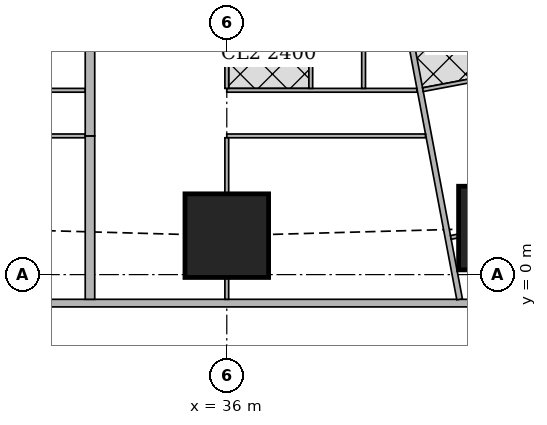
"""IFC4 building model, lengths in metres.
Left out: names, types, materials, properties, quantities, classifications, styles, units other than length and angle.
Written with IfcOpenShell. Run it as: python <this file> out.ifc"""

import sys

from ifc_helpers import new_model, si_unit, direction, frame, frame_2d, origin, origin_2d, place, context, subcontext, project, spatial, rectangle, extrude, element, fill, save


model = new_model("IFC4")
c1 = context("Model", 3, precision=1e-05, world=origin(), true_north=direction((0.0, 1.0)))
c2 = subcontext(c1, "Body", "Model", "MODEL_VIEW")
j1 = project(units=[si_unit("LENGTHUNIT", "METRE"), si_unit("PLANEANGLEUNIT", "RADIAN")], contexts=[c1])
p1 = place(None, origin())
s1 = spatial("IfcSite", under=j1, at=p1, CompositionType="ELEMENT")
p2 = place(p1, origin())
s2 = spatial("IfcBuilding", under=s1, at=p2, CompositionType="ELEMENT")
p3 = place(p2, frame((0.0, 0.0, 100.4)))
s3 = spatial("IfcBuildingStorey", under=s2, at=p3, CompositionType="ELEMENT", Elevation=100.4)
for number, where, z_axis, x_axis in (
    (1, (36.0, 1.025, 0.0), (0.0, 0.0, 1.0), (1.0, 0.0, 0.0)),
    (2, (43.2, 1.225, 0.0), (0.0, 0.0, 1.0), (1.0, 0.0, 0.0)),
):
    element("IfcColumn", number, at=place(p3, frame(where, z_axis=z_axis, x_axis=x_axis)), inside=s3, PredefinedType="COLUMN", context=c2, shape_type="SweptSolid", body=[
        extrude(rectangle(XDim=2.2, YDim=2.2, at=origin_2d()), origin(), (0.0, 0.0, 1.0), 3.75),
    ])
p4 = place(p3, frame((2.163, -0.75, 0.0), z_axis=(0.0, 0.0, 1.0), x_axis=(1.0, 0.0, 0.0)))
e3 = element("IfcWall", 3, at=p4, inside=s3, PredefinedType="SOLIDWALL", context=c2, shape_type="SweptSolid", body=[
    extrude(rectangle(XDim=45.628, YDim=0.2, at=frame_2d((22.814, 0.0))), origin(), (0.0, 0.0, 1.0), 3.5),
])
p5 = place(p4, frame((9.537, 0.0, 0.9)))
e4 = element("IfcOpeningElement", 4, at=p5, cuts=e3, PredefinedType="OPENING", context=c2, shape_type="SweptSolid", body=[
    extrude(rectangle(XDim=1.8, YDim=1.5, at=frame_2d((0.9, 0.75))), frame((0.0, 0.11, 0.0), z_axis=(0.0, -1.0, 0.0), x_axis=(1.0, 0.0, 0.0)), (0.0, 0.0, 1.0), 0.22),
])
p6 = place(p4, frame((13.137, 0.0, 0.9)))
e5 = element("IfcOpeningElement", 5, at=p6, cuts=e3, PredefinedType="OPENING", context=c2, shape_type="SweptSolid", body=[
    extrude(rectangle(XDim=1.8, YDim=1.5, at=frame_2d((0.9, 0.75))), frame((0.0, 0.11, 0.0), z_axis=(0.0, -1.0, 0.0), x_axis=(1.0, 0.0, 0.0)), (0.0, 0.0, 1.0), 0.22),
])
p7 = place(p4, frame((16.737, 0.0, 0.9)))
e6 = element("IfcOpeningElement", 6, at=p7, cuts=e3, PredefinedType="OPENING", context=c2, shape_type="SweptSolid", body=[
    extrude(rectangle(XDim=1.8, YDim=1.5, at=frame_2d((0.9, 0.75))), frame((0.0, 0.11, 0.0), z_axis=(0.0, -1.0, 0.0), x_axis=(1.0, 0.0, 0.0)), (0.0, 0.0, 1.0), 0.22),
])
p8 = place(p4, frame((20.337, 0.0, 0.9)))
e7 = element("IfcOpeningElement", 7, at=p8, cuts=e3, PredefinedType="OPENING", context=c2, shape_type="SweptSolid", body=[
    extrude(rectangle(XDim=1.8, YDim=1.5, at=frame_2d((0.9, 0.75))), frame((0.0, 0.11, 0.0), z_axis=(0.0, -1.0, 0.0), x_axis=(1.0, 0.0, 0.0)), (0.0, 0.0, 1.0), 0.22),
])
p9 = place(p4, frame((23.937, 0.0, 0.9)))
e8 = element("IfcOpeningElement", 8, at=p9, cuts=e3, PredefinedType="OPENING", context=c2, shape_type="SweptSolid", body=[
    extrude(rectangle(XDim=1.8, YDim=1.5, at=frame_2d((0.9, 0.75))), frame((0.0, 0.11, 0.0), z_axis=(0.0, -1.0, 0.0), x_axis=(1.0, 0.0, 0.0)), (0.0, 0.0, 1.0), 0.22),
])
p10 = place(p4, frame((27.537, 0.0, 0.9)))
e9 = element("IfcOpeningElement", 9, at=p10, cuts=e3, PredefinedType="OPENING", context=c2, shape_type="SweptSolid", body=[
    extrude(rectangle(XDim=1.8, YDim=1.5, at=frame_2d((0.9, 0.75))), frame((0.0, 0.11, 0.0), z_axis=(0.0, -1.0, 0.0), x_axis=(1.0, 0.0, 0.0)), (0.0, 0.0, 1.0), 0.22),
])
p11 = place(p4, frame((31.137, 0.0, 0.9)))
e10 = element("IfcOpeningElement", 10, at=p11, cuts=e3, PredefinedType="OPENING", context=c2, shape_type="SweptSolid", body=[
    extrude(rectangle(XDim=1.8, YDim=1.5, at=frame_2d((0.9, 0.75))), frame((0.0, 0.11, 0.0), z_axis=(0.0, -1.0, 0.0), x_axis=(1.0, 0.0, 0.0)), (0.0, 0.0, 1.0), 0.22),
])
p12 = place(p4, frame((34.737, 0.0, 0.9)))
e11 = element("IfcOpeningElement", 11, at=p12, cuts=e3, PredefinedType="OPENING", context=c2, shape_type="SweptSolid", body=[
    extrude(rectangle(XDim=1.8, YDim=1.5, at=frame_2d((0.9, 0.75))), frame((0.0, 0.11, 0.0), z_axis=(0.0, -1.0, 0.0), x_axis=(1.0, 0.0, 0.0)), (0.0, 0.0, 1.0), 0.22),
])
p13 = place(p3, frame((33.382, 45.65, 0.0), z_axis=(0.0, 0.0, 1.0), x_axis=(0.185593544777, -0.982626600565, 0.0)))
e12 = element("IfcWall", 12, at=p13, inside=s3, PredefinedType="SOLIDWALL", context=c2, shape_type="SweptSolid", body=[
    extrude(rectangle(XDim=47.118, YDim=0.15, at=frame_2d((23.559, 0.0))), origin(), (0.0, 0.0, 1.0), 2.2),
])
p14 = place(p13, frame((10.662, 0.0, 0.0)))
e13 = element("IfcOpeningElement", 13, at=p14, cuts=e12, PredefinedType="OPENING", context=c2, shape_type="SweptSolid", body=[
    extrude(rectangle(XDim=1.0, YDim=2.1, at=frame_2d((0.5, 1.05))), frame((0.0, 0.085, 0.0), z_axis=(0.0, -1.0, 0.0), x_axis=(1.0, 0.0, 0.0)), (0.0, 0.0, 1.0), 0.17),
])
p15 = place(p13, frame((15.237, 0.0, 0.0)))
e14 = element("IfcOpeningElement", 14, at=p15, cuts=e12, PredefinedType="OPENING", context=c2, shape_type="SweptSolid", body=[
    extrude(rectangle(XDim=1.0, YDim=2.1, at=frame_2d((0.5, 1.05))), frame((0.0, 0.085, 0.0), z_axis=(0.0, -1.0, 0.0), x_axis=(1.0, 0.0, 0.0)), (0.0, 0.0, 1.0), 0.17),
])
p16 = place(p13, frame((27.341, 0.0, 0.0)))
e15 = element("IfcOpeningElement", 15, at=p16, cuts=e12, PredefinedType="OPENING", context=c2, shape_type="SweptSolid", body=[
    extrude(rectangle(XDim=1.0, YDim=2.1, at=frame_2d((0.5, 1.05))), frame((0.0, 0.085, 0.0), z_axis=(0.0, -1.0, 0.0), x_axis=(1.0, 0.0, 0.0)), (0.0, 0.0, 1.0), 0.17),
])
p17 = place(p13, frame((33.833, 0.0, 0.0)))
e16 = element("IfcOpeningElement", 16, at=p17, cuts=e12, PredefinedType="OPENING", context=c2, shape_type="SweptSolid", body=[
    extrude(rectangle(XDim=1.0, YDim=2.1, at=frame_2d((0.5, 1.05))), frame((0.0, 0.085, 0.0), z_axis=(0.0, -1.0, 0.0), x_axis=(1.0, 0.0, 0.0)), (0.0, 0.0, 1.0), 0.17),
])
p18 = place(p3, frame((32.275, 3.65, 0.0), z_axis=(0.0, 0.0, 1.0), x_axis=(-1.0, 0.0, 0.0)))
e17 = element("IfcWall", 17, at=p18, inside=s3, PredefinedType="PARTITIONING", context=c2, shape_type="SweptSolid", body=[
    extrude(rectangle(XDim=7.075, YDim=0.1, at=frame_2d((3.538, 0.0))), origin(), (0.0, 0.0, 1.0), 3.5),
])
p19 = place(p18, frame((5.975, 0.0, 0.0)))
e18 = element("IfcOpeningElement", 18, at=p19, cuts=e17, PredefinedType="OPENING", context=c2, shape_type="SweptSolid", body=[
    extrude(rectangle(XDim=0.9, YDim=2.1, at=frame_2d((0.45, 1.05))), frame((0.0, 0.06, 0.0), z_axis=(0.0, -1.0, 0.0), x_axis=(1.0, 0.0, 0.0)), (0.0, 0.0, 1.0), 0.12),
])
p20 = place(p18, frame((2.375, 0.0, 0.0)))
e19 = element("IfcOpeningElement", 19, at=p20, cuts=e17, PredefinedType="OPENING", context=c2, shape_type="SweptSolid", body=[
    extrude(rectangle(XDim=0.9, YDim=2.1, at=frame_2d((0.45, 1.05))), frame((0.0, 0.06, 0.0), z_axis=(0.0, -1.0, 0.0), x_axis=(1.0, 0.0, 0.0)), (0.0, 0.0, 1.0), 0.12),
])
p21 = place(p3, frame((32.275, 4.85, 0.0), z_axis=(0.0, 0.0, 1.0), x_axis=(-1.0, 0.0, 0.0)))
e20 = element("IfcWall", 20, at=p21, inside=s3, PredefinedType="PARTITIONING", context=c2, shape_type="SweptSolid", body=[
    extrude(rectangle(XDim=7.075, YDim=0.1, at=frame_2d((3.538, 0.0))), origin(), (0.0, 0.0, 1.0), 3.5),
])
p22 = place(p21, frame((5.52, 0.0, 0.0)))
e21 = element("IfcOpeningElement", 21, at=p22, cuts=e20, PredefinedType="OPENING", context=c2, shape_type="SweptSolid", body=[
    extrude(rectangle(XDim=0.9, YDim=2.1, at=frame_2d((0.45, 1.05))), frame((0.0, 0.06, 0.0), z_axis=(0.0, -1.0, 0.0), x_axis=(1.0, 0.0, 0.0)), (0.0, 0.0, 1.0), 0.12),
])
p23 = place(p21, frame((2.225, 0.0, 0.0)))
e22 = element("IfcOpeningElement", 22, at=p23, cuts=e20, PredefinedType="OPENING", context=c2, shape_type="SweptSolid", body=[
    extrude(rectangle(XDim=0.9, YDim=2.1, at=frame_2d((0.45, 1.05))), frame((0.0, 0.06, 0.0), z_axis=(0.0, -1.0, 0.0), x_axis=(1.0, 0.0, 0.0)), (0.0, 0.0, 1.0), 0.12),
])
p24 = place(p21, frame((3.72, 0.0, 0.0)))
e23 = element("IfcOpeningElement", 23, at=p24, cuts=e20, PredefinedType="OPENING", context=c2, shape_type="SweptSolid", body=[
    extrude(rectangle(XDim=0.9, YDim=2.1, at=frame_2d((0.45, 1.05))), frame((0.0, 0.06, 0.0), z_axis=(0.0, -1.0, 0.0), x_axis=(1.0, 0.0, 0.0)), (0.0, 0.0, 1.0), 0.12),
])
p25 = place(p21, frame((0.425, 0.0, 0.0)))
e24 = element("IfcOpeningElement", 24, at=p25, cuts=e20, PredefinedType="OPENING", context=c2, shape_type="SweptSolid", body=[
    extrude(rectangle(XDim=0.9, YDim=2.1, at=frame_2d((0.45, 1.05))), frame((0.0, 0.06, 0.0), z_axis=(0.0, -1.0, 0.0), x_axis=(1.0, 0.0, 0.0)), (0.0, 0.0, 1.0), 0.12),
])
p26 = place(p3, frame((41.229, 3.65, 0.0), z_axis=(0.0, 0.0, 1.0), x_axis=(-1.0, 0.0, 0.0)))
e25 = element("IfcWall", 25, at=p26, inside=s3, PredefinedType="PARTITIONING", context=c2, shape_type="SweptSolid", body=[
    extrude(rectangle(XDim=5.229, YDim=0.1, at=frame_2d((2.615, 0.0))), origin(), (0.0, 0.0, 1.0), 3.5),
])
p27 = place(p26, frame((4.129, 0.0, 0.0)))
e26 = element("IfcOpeningElement", 26, at=p27, cuts=e25, PredefinedType="OPENING", context=c2, shape_type="SweptSolid", body=[
    extrude(rectangle(XDim=0.9, YDim=2.1, at=frame_2d((0.45, 1.05))), frame((0.0, 0.06, 0.0), z_axis=(0.0, -1.0, 0.0), x_axis=(1.0, 0.0, 0.0)), (0.0, 0.0, 1.0), 0.12),
])
p28 = place(p3, frame((41.002, 4.85, 0.0), z_axis=(0.0, 0.0, 1.0), x_axis=(-1.0, 0.0, 0.0)))
e27 = element("IfcWall", 27, at=p28, inside=s3, PredefinedType="PARTITIONING", context=c2, shape_type="SweptSolid", body=[
    extrude(rectangle(XDim=5.002, YDim=0.1, at=frame_2d((2.501, 0.0))), origin(), (0.0, 0.0, 1.0), 3.5),
])
p29 = place(p28, frame((3.447, 0.0, 0.0)))
e28 = element("IfcOpeningElement", 28, at=p29, cuts=e27, PredefinedType="OPENING", context=c2, shape_type="SweptSolid", body=[
    extrude(rectangle(XDim=0.9, YDim=2.1, at=frame_2d((0.45, 1.05))), frame((0.0, 0.06, 0.0), z_axis=(0.0, -1.0, 0.0), x_axis=(1.0, 0.0, 0.0)), (0.0, 0.0, 1.0), 0.12),
])
p30 = place(p28, frame((0.15, 0.0, 0.0)))
e29 = element("IfcOpeningElement", 29, at=p30, cuts=e27, PredefinedType="OPENING", context=c2, shape_type="SweptSolid", body=[
    extrude(rectangle(XDim=0.9, YDim=2.1, at=frame_2d((0.45, 1.05))), frame((0.0, 0.06, 0.0), z_axis=(0.0, -1.0, 0.0), x_axis=(1.0, 0.0, 0.0)), (0.0, 0.0, 1.0), 0.12),
])
p31 = place(p28, frame((1.647, 0.0, 0.0)))
e30 = element("IfcOpeningElement", 30, at=p31, cuts=e27, PredefinedType="OPENING", context=c2, shape_type="SweptSolid", body=[
    extrude(rectangle(XDim=0.9, YDim=2.1, at=frame_2d((0.45, 1.05))), frame((0.0, 0.06, 0.0), z_axis=(0.0, -1.0, 0.0), x_axis=(1.0, 0.0, 0.0)), (0.0, 0.0, 1.0), 0.12),
])
p32 = place(p3, frame((36.0, -0.65, 0.0), z_axis=(0.0, 0.0, 1.0), x_axis=(0.0, 1.0, 0.0)))
e31 = element("IfcWall", 31, at=p32, inside=s3, PredefinedType="PARTITIONING", context=c2, shape_type="SweptSolid", body=[
    extrude(rectangle(XDim=0.574, YDim=0.1, at=frame_2d((0.287, 0.0))), origin(), (0.0, 0.0, 1.0), 3.5),
])
p33 = place(p3, frame((36.0, 2.126, 0.0), z_axis=(0.0, 0.0, 1.0), x_axis=(0.0, 1.0, 0.0)))
e32 = element("IfcWall", 32, at=p33, inside=s3, PredefinedType="PARTITIONING", context=c2, shape_type="SweptSolid", body=[
    extrude(rectangle(XDim=1.474, YDim=0.1, at=frame_2d((0.737, 0.0))), origin(), (0.0, 0.0, 1.0), 3.5),
])
p34 = place(p3, frame((36.0, 4.9, 0.0), z_axis=(0.0, 0.0, 1.0), x_axis=(0.0, 1.0, 0.0)))
e33 = element("IfcWall", 33, at=p34, inside=s3, PredefinedType="PARTITIONING", context=c2, shape_type="SweptSolid", body=[
    extrude(rectangle(XDim=1.799, YDim=0.1, at=frame_2d((0.899, 0.0))), origin(), (0.0, 0.0, 1.0), 3.5),
])
for number, where, z_axis, x_axis in (
    (34, (39.6, 4.9, 0.0), (0.0, 0.0, 1.0), (0.0, 1.0, 0.0)),
    (35, (38.21, 4.9, 0.0), (0.0, 0.0, 1.0), (0.0, 1.0, 0.0)),
):
    element("IfcWall", number, at=place(p3, frame(where, z_axis=z_axis, x_axis=x_axis)), inside=s3, PredefinedType="PARTITIONING", context=c2, shape_type="SweptSolid", body=[
        extrude(rectangle(XDim=3.275, YDim=0.1, at=frame_2d((1.638, 0.0))), origin(), (0.0, 0.0, 1.0), 3.5),
    ])
p35 = place(p3, frame((32.4, -0.65, 0.0), z_axis=(0.0, 0.0, 1.0), x_axis=(0.0, 1.0, 0.0)))
e36 = element("IfcWall", 36, at=p35, inside=s3, PredefinedType="SOLIDWALL", context=c2, shape_type="SweptSolid", body=[
    extrude(rectangle(XDim=4.3, YDim=0.25, at=frame_2d((2.15, 0.0))), origin(), (0.0, 0.0, 1.0), 2.2),
])
p36 = place(p3, frame((32.4, 3.65, 0.0), z_axis=(0.0, 0.0, 1.0), x_axis=(0.0, 1.0, 0.0)))
e37 = element("IfcWall", 37, at=p36, inside=s3, PredefinedType="SOLIDWALL", context=c2, shape_type="SweptSolid", body=[
    extrude(rectangle(XDim=4.525, YDim=0.25, at=frame_2d((2.263, 0.0))), origin(), (0.0, 0.0, 1.0), 3.5),
])
p37 = place(p3, frame((42.09, 1.016, 0.0), z_axis=(0.0, 0.0, 1.0), x_axis=(-0.982208563973, -0.187793335502, 0.0)))
e38 = element("IfcWall", 38, at=p37, inside=s3, PredefinedType="PARTITIONING", context=c2, shape_type="SweptSolid", body=[
    extrude(rectangle(XDim=0.198, YDim=0.1, at=frame_2d((0.099, 0.0))), origin(), (0.0, 0.0, 1.0), 2.05),
])
p38 = place(p3, frame((44.379, 5.474, 0.0), z_axis=(0.0, 0.0, 1.0), x_axis=(-0.982607026909, -0.185697147715, 0.0)))
e39 = element("IfcWall", 39, at=p38, inside=s3, PredefinedType="PARTITIONING", context=c2, shape_type="SweptSolid", body=[
    extrude(rectangle(XDim=3.275, YDim=0.1, at=frame_2d((1.637, 0.0))), origin(), (0.0, 0.0, 1.0), 3.5),
])
p39 = place(p10, origin())
e40 = element("IfcWindow", 40, at=p39, inside=s3, PartitioningType="SINGLE_PANEL", PredefinedType="WINDOW", context=c2, shape_type="SweptSolid", body=[
    extrude(rectangle(XDim=1.8, YDim=1.5, at=frame_2d((0.9, 0.75))), frame((0.0, 0.03, 0.0), z_axis=(0.0, -1.0, 0.0), x_axis=(1.0, 0.0, 0.0)), (0.0, 0.0, 1.0), 0.06),
])
fill(e9, e40)
p40 = place(p11, origin())
e41 = element("IfcWindow", 41, at=p40, inside=s3, PartitioningType="SINGLE_PANEL", PredefinedType="WINDOW", context=c2, shape_type="SweptSolid", body=[
    extrude(rectangle(XDim=1.8, YDim=1.5, at=frame_2d((0.9, 0.75))), frame((0.0, 0.03, 0.0), z_axis=(0.0, -1.0, 0.0), x_axis=(1.0, 0.0, 0.0)), (0.0, 0.0, 1.0), 0.06),
])
fill(e10, e41)
p41 = place(p12, origin())
e42 = element("IfcWindow", 42, at=p41, inside=s3, PartitioningType="SINGLE_PANEL", PredefinedType="WINDOW", context=c2, shape_type="SweptSolid", body=[
    extrude(rectangle(XDim=1.8, YDim=1.5, at=frame_2d((0.9, 0.75))), frame((0.0, 0.03, 0.0), z_axis=(0.0, -1.0, 0.0), x_axis=(1.0, 0.0, 0.0)), (0.0, 0.0, 1.0), 0.06),
])
fill(e11, e42)
p42 = place(p25, origin())
e43 = element("IfcDoor", 43, at=p42, inside=s3, OperationType="SINGLE_SWING_RIGHT", PredefinedType="DOOR", context=c2, shape_type="SweptSolid", body=[
    extrude(rectangle(XDim=0.9, YDim=2.1, at=frame_2d((0.45, 1.05))), frame((0.0, 0.025, 0.0), z_axis=(0.0, -1.0, 0.0), x_axis=(1.0, 0.0, 0.0)), (0.0, 0.0, 1.0), 0.05),
])
fill(e24, e43)
p43 = place(p27, origin())
e44 = element("IfcDoor", 44, at=p43, inside=s3, OperationType="SINGLE_SWING_LEFT", PredefinedType="DOOR", context=c2, shape_type="SweptSolid", body=[
    extrude(rectangle(XDim=0.9, YDim=2.1, at=frame_2d((0.45, 1.05))), frame((0.0, 0.025, 0.0), z_axis=(0.0, -1.0, 0.0), x_axis=(1.0, 0.0, 0.0)), (0.0, 0.0, 1.0), 0.05),
])
fill(e26, e44)
p44 = place(p29, origin())
e45 = element("IfcDoor", 45, at=p44, inside=s3, OperationType="SINGLE_SWING_LEFT", PredefinedType="DOOR", context=c2, shape_type="SweptSolid", body=[
    extrude(rectangle(XDim=0.9, YDim=2.1, at=frame_2d((0.45, 1.05))), frame((0.0, 0.025, 0.0), z_axis=(0.0, -1.0, 0.0), x_axis=(1.0, 0.0, 0.0)), (0.0, 0.0, 1.0), 0.05),
])
fill(e28, e45)
p45 = place(p30, origin())
e46 = element("IfcDoor", 46, at=p45, inside=s3, OperationType="SINGLE_SWING_RIGHT", PredefinedType="DOOR", context=c2, shape_type="SweptSolid", body=[
    extrude(rectangle(XDim=0.9, YDim=2.1, at=frame_2d((0.45, 1.05))), frame((0.0, 0.025, 0.0), z_axis=(0.0, -1.0, 0.0), x_axis=(1.0, 0.0, 0.0)), (0.0, 0.0, 1.0), 0.05),
])
fill(e29, e46)
p46 = place(p31, origin())
e47 = element("IfcDoor", 47, at=p46, inside=s3, OperationType="SINGLE_SWING_LEFT", PredefinedType="DOOR", context=c2, shape_type="SweptSolid", body=[
    extrude(rectangle(XDim=0.9, YDim=2.1, at=frame_2d((0.45, 1.05))), frame((0.0, 0.025, 0.0), z_axis=(0.0, -1.0, 0.0), x_axis=(1.0, 0.0, 0.0)), (0.0, 0.0, 1.0), 0.05),
])
fill(e30, e47)
save(model, sys.argv[1])
